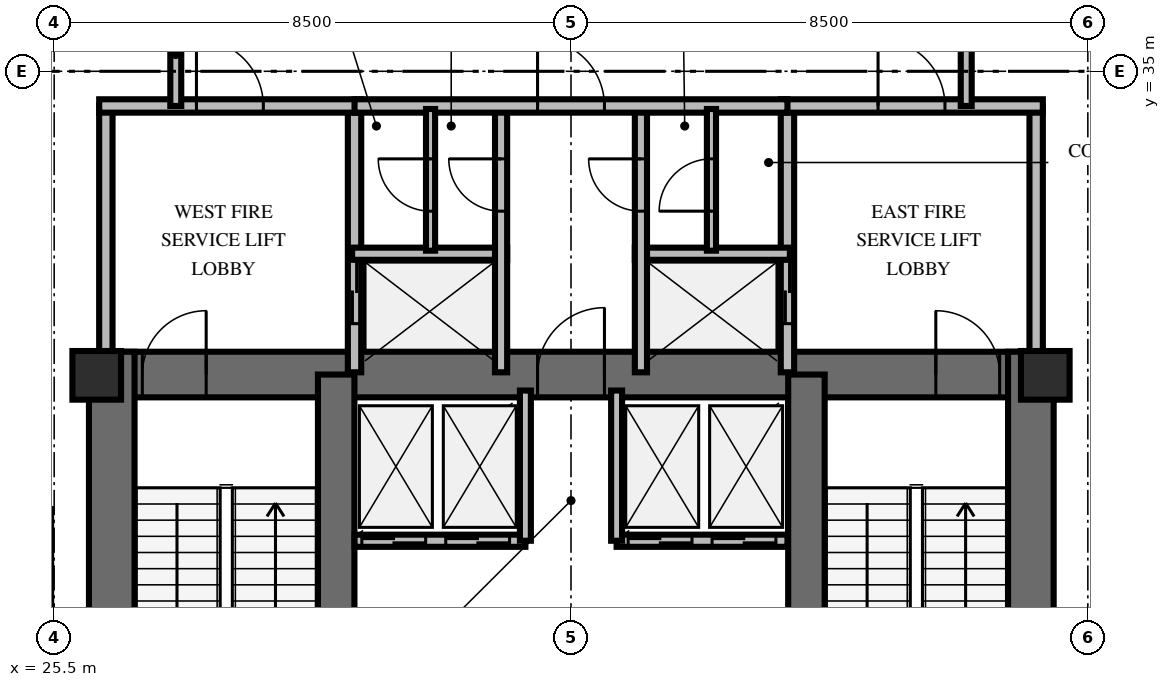
"""IFC4 building model, lengths in metres.
Left out: names, types, materials, properties, quantities, classifications, styles, units other than length and angle.
Written with IfcOpenShell. Run it as: python <this file> out.ifc"""

import sys

from ifc_helpers import new_model, si_unit, direction, frame, frame_2d, origin, origin_2d, place, context, subcontext, project, spatial, rectangle, extrude, element, fill, save


model = new_model("IFC4")
c1 = context("Model", 3, precision=1e-05, world=origin(), true_north=direction((0.0, 1.0)))
c2 = subcontext(c1, "Body", "Model", "MODEL_VIEW")
j1 = project(units=[si_unit("LENGTHUNIT", "METRE"), si_unit("PLANEANGLEUNIT", "RADIAN")], contexts=[c1])
p1 = place(None, origin())
s1 = spatial("IfcSite", under=j1, at=p1, CompositionType="ELEMENT")
p2 = place(p1, origin())
s2 = spatial("IfcBuilding", under=s1, at=p2, CompositionType="ELEMENT")
p3 = place(p2, frame((0.0, 0.0, 153.8)))
s3 = spatial("IfcBuildingStorey", under=s2, at=p3, CompositionType="ELEMENT", Elevation=153.8)
p4 = place(p3, frame((26.072, 30.013, 0.0), z_axis=(0.0, 0.0, 1.0), x_axis=(1.0, 0.0, 0.0)))
e1 = element("IfcWall", 1, at=p4, inside=s3, PredefinedType="SHEAR", context=c2, shape_type="SweptSolid", body=[
    extrude(rectangle(XDim=15.866, YDim=0.75, at=frame_2d((7.933, 0.0))), origin(), (0.0, 0.0, 1.0), 4.0),
])
p5 = place(p4, frame((0.878, 0.0, 0.0)))
e2 = element("IfcOpeningElement", 2, at=p5, cuts=e1, PredefinedType="OPENING", context=c2, shape_type="SweptSolid", body=[
    extrude(rectangle(XDim=1.05, YDim=2.15, at=frame_2d((0.525, 1.075))), frame((0.0, 0.385, 0.0), z_axis=(0.0, -1.0, 0.0), x_axis=(1.0, 0.0, 0.0)), (0.0, 0.0, 1.0), 0.77),
])
p6 = place(p4, frame((13.928, 0.0, 0.0)))
e3 = element("IfcOpeningElement", 3, at=p6, cuts=e1, PredefinedType="OPENING", context=c2, shape_type="SweptSolid", body=[
    extrude(rectangle(XDim=1.05, YDim=2.15, at=frame_2d((0.525, 1.075))), frame((0.0, 0.385, 0.0), z_axis=(0.0, -1.0, 0.0), x_axis=(1.0, 0.0, 0.0)), (0.0, 0.0, 1.0), 0.77),
])
p7 = place(p4, frame((7.378, 0.0, 0.0)))
e4 = element("IfcOpeningElement", 4, at=p7, cuts=e1, PredefinedType="OPENING", context=c2, shape_type="SweptSolid", body=[
    extrude(rectangle(XDim=1.1, YDim=2.15, at=frame_2d((0.55, 1.075))), frame((0.0, 0.385, 0.0), z_axis=(0.0, -1.0, 0.0), x_axis=(1.0, 0.0, 0.0)), (0.0, 0.0, 1.0), 0.77),
])
for number, where, z_axis, x_axis in (
    (5, (26.447, 19.812, 0.0), (0.0, 0.0, 1.0), (0.0, 1.0, 0.0)),
    (6, (41.563, 19.812, 0.0), (0.0, 0.0, 1.0), (0.0, 1.0, 0.0)),
):
    element("IfcWall", number, at=place(p3, frame(where, z_axis=z_axis, x_axis=x_axis)), inside=s3, PredefinedType="SHEAR", context=c2, shape_type="SweptSolid", body=[
        extrude(rectangle(XDim=10.576, YDim=0.75, at=frame_2d((5.288, 0.0))), origin(), (0.0, 0.0, 1.0), 4.0),
    ])
for number, where, z_axis, x_axis in (
    (7, (30.138, 20.187, 0.0), (0.0, 0.0, 1.0), (0.0, 1.0, 0.0)),
    (8, (37.872, 20.187, 0.0), (0.0, 0.0, 1.0), (0.0, 1.0, 0.0)),
):
    element("IfcWall", number, at=place(p3, frame(where, z_axis=z_axis, x_axis=x_axis)), inside=s3, PredefinedType="SHEAR", context=c2, shape_type="SweptSolid", body=[
        extrude(rectangle(XDim=9.826, YDim=0.6, at=frame_2d((4.913, 0.0))), origin(), (0.0, 0.0, 1.0), 4.0),
    ])
for number, where, z_axis, x_axis in (
    (9, (26.2, 30.0, 0.0), (0.0, 0.0, 1.0), (1.0, 0.0, 0.0)),
    (10, (41.8, 30.0, 0.0), (0.0, 0.0, 1.0), (1.0, 0.0, 0.0)),
):
    element("IfcColumn", number, at=place(p3, frame(where, z_axis=z_axis, x_axis=x_axis)), inside=s3, PredefinedType="PILASTER", context=c2, shape_type="SweptSolid", body=[
        extrude(rectangle(XDim=0.8, YDim=0.8, at=origin_2d()), origin(), (0.0, 0.0, 1.0), 4.0),
    ])
p8 = place(p3, frame((26.35, 30.05, 0.0), z_axis=(0.0, 0.0, 1.0), x_axis=(0.0, 1.0, 0.0)))
e11 = element("IfcWall", 11, at=p8, inside=s3, PredefinedType="SOLIDWALL", context=c2, shape_type="SweptSolid", body=[
    extrude(rectangle(XDim=4.38, YDim=0.22, at=frame_2d((2.19, 0.0))), origin(), (0.0, 0.0, 1.0), 2.76),
])
p9 = place(p3, frame((30.44, 30.05, 0.0), z_axis=(0.0, 0.0, 1.0), x_axis=(0.0, 1.0, 0.0)))
e12 = element("IfcWall", 12, at=p9, inside=s3, PredefinedType="SOLIDWALL", context=c2, shape_type="SweptSolid", body=[
    extrude(rectangle(XDim=4.38, YDim=0.22, at=frame_2d((2.19, 0.0))), origin(), (0.0, 0.0, 1.0), 2.76),
])
p10 = place(p9, frame((0.8, 0.0, 0.0)))
e13 = element("IfcOpeningElement", 13, at=p10, cuts=e12, PredefinedType="OPENING", context=c2, shape_type="SweptSolid", body=[
    extrude(rectangle(XDim=1.05, YDim=2.1, at=frame_2d((0.525, 1.05))), frame((0.0, 0.12, 0.0), z_axis=(0.0, -1.0, 0.0), x_axis=(1.0, 0.0, 0.0)), (0.0, 0.0, 1.0), 0.24),
])
p11 = place(p3, frame((26.24, 34.43, 0.0), z_axis=(0.0, 0.0, 1.0), x_axis=(1.0, 0.0, 0.0)))
e14 = element("IfcWall", 14, at=p11, inside=s3, PredefinedType="SOLIDWALL", context=c2, shape_type="SweptSolid", body=[
    extrude(rectangle(XDim=4.31, YDim=0.22, at=frame_2d((2.155, 0.0))), origin(), (0.0, 0.0, 1.0), 2.76),
])
p12 = place(p11, frame((1.6, 0.0, 0.0)))
e15 = element("IfcOpeningElement", 15, at=p12, cuts=e14, PredefinedType="OPENING", context=c2, shape_type="SweptSolid", body=[
    extrude(rectangle(XDim=1.1, YDim=2.15, at=frame_2d((0.55, 1.075))), frame((0.0, 0.12, 0.0), z_axis=(0.0, -1.0, 0.0), x_axis=(1.0, 0.0, 0.0)), (0.0, 0.0, 1.0), 0.24),
])
p13 = place(p3, frame((30.4, 32.0, 0.0), z_axis=(0.0, 0.0, 1.0), x_axis=(1.0, 0.0, 0.0)))
e16 = element("IfcWall", 16, at=p13, inside=s3, PredefinedType="SOLIDWALL", context=c2, shape_type="SweptSolid", body=[
    extrude(rectangle(XDim=2.55, YDim=0.2, at=frame_2d((1.275, 0.0))), origin(), (0.0, 0.0, 1.0), 2.76),
])
p14 = place(p3, frame((32.85, 30.05, 0.0), z_axis=(0.0, 0.0, 1.0), x_axis=(0.0, 1.0, 0.0)))
e17 = element("IfcWall", 17, at=p14, inside=s3, PredefinedType="SOLIDWALL", context=c2, shape_type="SweptSolid", body=[
    extrude(rectangle(XDim=4.38, YDim=0.2, at=frame_2d((2.19, 0.0))), origin(), (0.0, 0.0, 1.0), 2.76),
])
p15 = place(p14, frame((2.65, 0.0, 0.0)))
e18 = element("IfcOpeningElement", 18, at=p15, cuts=e17, PredefinedType="OPENING", context=c2, shape_type="SweptSolid", body=[
    extrude(rectangle(XDim=0.86, YDim=2.05, at=frame_2d((0.43, 1.025))), frame((0.0, 0.11, 0.0), z_axis=(0.0, -1.0, 0.0), x_axis=(1.0, 0.0, 0.0)), (0.0, 0.0, 1.0), 0.22),
])
p16 = place(p3, frame((37.56, 30.05, 0.0), z_axis=(0.0, 0.0, 1.0), x_axis=(0.0, 1.0, 0.0)))
e19 = element("IfcWall", 19, at=p16, inside=s3, PredefinedType="SOLIDWALL", context=c2, shape_type="SweptSolid", body=[
    extrude(rectangle(XDim=4.38, YDim=0.22, at=frame_2d((2.19, 0.0))), origin(), (0.0, 0.0, 1.0), 2.76),
])
p17 = place(p16, frame((0.8, 0.0, 0.0)))
e20 = element("IfcOpeningElement", 20, at=p17, cuts=e19, PredefinedType="OPENING", context=c2, shape_type="SweptSolid", body=[
    extrude(rectangle(XDim=1.05, YDim=2.1, at=frame_2d((0.525, 1.05))), frame((0.0, 0.12, 0.0), z_axis=(0.0, -1.0, 0.0), x_axis=(1.0, 0.0, 0.0)), (0.0, 0.0, 1.0), 0.24),
])
p18 = place(p3, frame((41.65, 30.05, 0.0), z_axis=(0.0, 0.0, 1.0), x_axis=(0.0, 1.0, 0.0)))
e21 = element("IfcWall", 21, at=p18, inside=s3, PredefinedType="SOLIDWALL", context=c2, shape_type="SweptSolid", body=[
    extrude(rectangle(XDim=4.38, YDim=0.22, at=frame_2d((2.19, 0.0))), origin(), (0.0, 0.0, 1.0), 2.76),
])
p19 = place(p3, frame((37.45, 34.43, 0.0), z_axis=(0.0, 0.0, 1.0), x_axis=(1.0, 0.0, 0.0)))
e22 = element("IfcWall", 22, at=p19, inside=s3, PredefinedType="SOLIDWALL", context=c2, shape_type="SweptSolid", body=[
    extrude(rectangle(XDim=4.31, YDim=0.22, at=frame_2d((2.155, 0.0))), origin(), (0.0, 0.0, 1.0), 2.76),
])
p20 = place(p19, frame((1.6, 0.0, 0.0)))
e23 = element("IfcOpeningElement", 23, at=p20, cuts=e22, PredefinedType="OPENING", context=c2, shape_type="SweptSolid", body=[
    extrude(rectangle(XDim=1.1, YDim=2.15, at=frame_2d((0.55, 1.075))), frame((0.0, 0.12, 0.0), z_axis=(0.0, -1.0, 0.0), x_axis=(1.0, 0.0, 0.0)), (0.0, 0.0, 1.0), 0.24),
])
p21 = place(p3, frame((35.05, 32.0, 0.0), z_axis=(0.0, 0.0, 1.0), x_axis=(1.0, 0.0, 0.0)))
e24 = element("IfcWall", 24, at=p21, inside=s3, PredefinedType="SOLIDWALL", context=c2, shape_type="SweptSolid", body=[
    extrude(rectangle(XDim=2.55, YDim=0.2, at=frame_2d((1.275, 0.0))), origin(), (0.0, 0.0, 1.0), 2.76),
])
p22 = place(p3, frame((35.15, 30.05, 0.0), z_axis=(0.0, 0.0, 1.0), x_axis=(0.0, 1.0, 0.0)))
e25 = element("IfcWall", 25, at=p22, inside=s3, PredefinedType="SOLIDWALL", context=c2, shape_type="SweptSolid", body=[
    extrude(rectangle(XDim=4.38, YDim=0.2, at=frame_2d((2.19, 0.0))), origin(), (0.0, 0.0, 1.0), 2.76),
])
p23 = place(p22, frame((2.65, 0.0, 0.0)))
e26 = element("IfcOpeningElement", 26, at=p23, cuts=e25, PredefinedType="OPENING", context=c2, shape_type="SweptSolid", body=[
    extrude(rectangle(XDim=0.86, YDim=2.05, at=frame_2d((0.43, 1.025))), frame((0.0, 0.11, 0.0), z_axis=(0.0, -1.0, 0.0), x_axis=(1.0, 0.0, 0.0)), (0.0, 0.0, 1.0), 0.22),
])
p24 = place(p3, frame((30.44, 34.43, 0.0), z_axis=(0.0, 0.0, 1.0), x_axis=(1.0, 0.0, 0.0)))
e27 = element("IfcWall", 27, at=p24, inside=s3, PredefinedType="SOLIDWALL", context=c2, shape_type="SweptSolid", body=[
    extrude(rectangle(XDim=7.12, YDim=0.22, at=frame_2d((3.56, 0.0))), origin(), (0.0, 0.0, 1.0), 2.76),
])
p25 = place(p24, frame((3.01, 0.0, 0.0)))
e28 = element("IfcOpeningElement", 28, at=p25, cuts=e27, PredefinedType="OPENING", context=c2, shape_type="SweptSolid", body=[
    extrude(rectangle(XDim=1.1, YDim=2.15, at=frame_2d((0.55, 1.075))), frame((0.0, 0.12, 0.0), z_axis=(0.0, -1.0, 0.0), x_axis=(1.0, 0.0, 0.0)), (0.0, 0.0, 1.0), 0.24),
])
p26 = place(p3, frame((31.69, 32.05, 0.0), z_axis=(0.0, 0.0, 1.0), x_axis=(0.0, 1.0, 0.0)))
e29 = element("IfcWall", 29, at=p26, inside=s3, PredefinedType="PARTITIONING", context=c2, shape_type="SweptSolid", body=[
    extrude(rectangle(XDim=2.33, YDim=0.15, at=frame_2d((1.165, 0.0))), origin(), (0.0, 0.0, 1.0), 2.76),
])
p27 = place(p26, frame((0.65, 0.0, 0.0)))
e30 = element("IfcOpeningElement", 30, at=p27, cuts=e29, PredefinedType="OPENING", context=c2, shape_type="SweptSolid", body=[
    extrude(rectangle(XDim=0.86, YDim=2.05, at=frame_2d((0.43, 1.025))), frame((0.0, 0.085, 0.0), z_axis=(0.0, -1.0, 0.0), x_axis=(1.0, 0.0, 0.0)), (0.0, 0.0, 1.0), 0.17),
])
p28 = place(p3, frame((36.31, 32.05, 0.0), z_axis=(0.0, 0.0, 1.0), x_axis=(0.0, 1.0, 0.0)))
e31 = element("IfcWall", 31, at=p28, inside=s3, PredefinedType="PARTITIONING", context=c2, shape_type="SweptSolid", body=[
    extrude(rectangle(XDim=2.33, YDim=0.15, at=frame_2d((1.165, 0.0))), origin(), (0.0, 0.0, 1.0), 2.76),
])
p29 = place(p28, frame((0.65, 0.0, 0.0)))
e32 = element("IfcOpeningElement", 32, at=p29, cuts=e31, PredefinedType="OPENING", context=c2, shape_type="SweptSolid", body=[
    extrude(rectangle(XDim=0.86, YDim=2.05, at=frame_2d((0.43, 1.025))), frame((0.0, 0.085, 0.0), z_axis=(0.0, -1.0, 0.0), x_axis=(1.0, 0.0, 0.0)), (0.0, 0.0, 1.0), 0.17),
])
p30 = place(p3, frame((30.44, 27.28, 0.0), z_axis=(0.0, 0.0, 1.0), x_axis=(1.0, 0.0, 0.0)))
e33 = element("IfcWall", 33, at=p30, inside=s3, PredefinedType="SOLIDWALL", context=c2, shape_type="SweptSolid", body=[
    extrude(rectangle(XDim=2.81, YDim=0.2, at=frame_2d((1.405, 0.0))), origin(), (0.0, 0.0, 1.0), 2.76),
])
p31 = place(p30, frame((0.12, 0.0, 0.0)))
e34 = element("IfcOpeningElement", 34, at=p31, cuts=e33, PredefinedType="OPENING", context=c2, shape_type="SweptSolid", body=[
    extrude(rectangle(XDim=1.05, YDim=2.1, at=frame_2d((0.525, 1.05))), frame((0.0, 0.11, 0.0), z_axis=(0.0, -1.0, 0.0), x_axis=(1.0, 0.0, 0.0)), (0.0, 0.0, 1.0), 0.22),
])
p32 = place(p30, frame((1.5, 0.0, 0.0)))
e35 = element("IfcOpeningElement", 35, at=p32, cuts=e33, PredefinedType="OPENING", context=c2, shape_type="SweptSolid", body=[
    extrude(rectangle(XDim=1.05, YDim=2.1, at=frame_2d((0.525, 1.05))), frame((0.0, 0.11, 0.0), z_axis=(0.0, -1.0, 0.0), x_axis=(1.0, 0.0, 0.0)), (0.0, 0.0, 1.0), 0.22),
])
p33 = place(p3, frame((33.25, 27.28, 0.0), z_axis=(0.0, 0.0, 1.0), x_axis=(0.0, 1.0, 0.0)))
e36 = element("IfcWall", 36, at=p33, inside=s3, PredefinedType="SOLIDWALL", context=c2, shape_type="SweptSolid", body=[
    extrude(rectangle(XDim=2.47, YDim=0.18, at=frame_2d((1.235, 0.0))), origin(), (0.0, 0.0, 1.0), 2.76),
])
p34 = place(p3, frame((34.75, 27.28, 0.0), z_axis=(0.0, 0.0, 1.0), x_axis=(1.0, 0.0, 0.0)))
e37 = element("IfcWall", 37, at=p34, inside=s3, PredefinedType="SOLIDWALL", context=c2, shape_type="SweptSolid", body=[
    extrude(rectangle(XDim=2.81, YDim=0.2, at=frame_2d((1.405, 0.0))), origin(), (0.0, 0.0, 1.0), 2.76),
])
p35 = place(p34, frame((0.19, 0.0, 0.0)))
e38 = element("IfcOpeningElement", 38, at=p35, cuts=e37, PredefinedType="OPENING", context=c2, shape_type="SweptSolid", body=[
    extrude(rectangle(XDim=1.05, YDim=2.1, at=frame_2d((0.525, 1.05))), frame((0.0, 0.11, 0.0), z_axis=(0.0, -1.0, 0.0), x_axis=(1.0, 0.0, 0.0)), (0.0, 0.0, 1.0), 0.22),
])
p36 = place(p34, frame((1.57, 0.0, 0.0)))
e39 = element("IfcOpeningElement", 39, at=p36, cuts=e37, PredefinedType="OPENING", context=c2, shape_type="SweptSolid", body=[
    extrude(rectangle(XDim=1.05, YDim=2.1, at=frame_2d((0.525, 1.05))), frame((0.0, 0.11, 0.0), z_axis=(0.0, -1.0, 0.0), x_axis=(1.0, 0.0, 0.0)), (0.0, 0.0, 1.0), 0.22),
])
p37 = place(p3, frame((34.75, 27.28, 0.0), z_axis=(0.0, 0.0, 1.0), x_axis=(0.0, 1.0, 0.0)))
e40 = element("IfcWall", 40, at=p37, inside=s3, PredefinedType="SOLIDWALL", context=c2, shape_type="SweptSolid", body=[
    extrude(rectangle(XDim=2.47, YDim=0.18, at=frame_2d((1.235, 0.0))), origin(), (0.0, 0.0, 1.0), 2.76),
])
for number, where, z_axis, x_axis in (
    (41, (27.5, 34.43, 0.0), (0.0, 0.0, 1.0), (0.0, 1.0, 0.0)),
    (42, (40.5, 36.123, 0.0), (0.0, 0.0, 1.0), (0.0, -1.0, 0.0)),
):
    element("IfcWall", number, at=place(p3, frame(where, z_axis=z_axis, x_axis=x_axis)), inside=s3, PredefinedType="PARTITIONING", context=c2, shape_type="SweptSolid", body=[
        extrude(rectangle(XDim=1.693, YDim=0.18, at=frame_2d((0.846, 0.0))), origin(), (0.0, 0.0, 1.0), 2.76),
    ])
p38 = place(p5, origin())
e43 = element("IfcDoor", 43, at=p38, inside=s3, OperationType="SINGLE_SWING_RIGHT", PredefinedType="DOOR", context=c2, shape_type="SweptSolid", body=[
    extrude(rectangle(XDim=1.05, YDim=2.15, at=frame_2d((0.525, 1.075))), frame((0.0, 0.025, 0.0), z_axis=(0.0, -1.0, 0.0), x_axis=(1.0, 0.0, 0.0)), (0.0, 0.0, 1.0), 0.05),
])
fill(e2, e43)
p39 = place(p6, origin())
e44 = element("IfcDoor", 44, at=p39, inside=s3, OperationType="SINGLE_SWING_LEFT", PredefinedType="DOOR", context=c2, shape_type="SweptSolid", body=[
    extrude(rectangle(XDim=1.05, YDim=2.15, at=frame_2d((0.525, 1.075))), frame((0.0, 0.025, 0.0), z_axis=(0.0, -1.0, 0.0), x_axis=(1.0, 0.0, 0.0)), (0.0, 0.0, 1.0), 0.05),
])
fill(e3, e44)
p40 = place(p7, origin())
e45 = element("IfcDoor", 45, at=p40, inside=s3, OperationType="SINGLE_SWING_RIGHT", PredefinedType="DOOR", context=c2, shape_type="SweptSolid", body=[
    extrude(rectangle(XDim=1.1, YDim=2.15, at=frame_2d((0.55, 1.075))), frame((0.0, 0.025, 0.0), z_axis=(0.0, -1.0, 0.0), x_axis=(1.0, 0.0, 0.0)), (0.0, 0.0, 1.0), 0.05),
])
fill(e4, e45)
p41 = place(p12, origin())
e46 = element("IfcDoor", 46, at=p41, inside=s3, OperationType="SINGLE_SWING_LEFT", PredefinedType="DOOR", context=c2, shape_type="SweptSolid", body=[
    extrude(rectangle(XDim=1.1, YDim=2.15, at=frame_2d((0.55, 1.075))), frame((0.0, 0.025, 0.0), z_axis=(0.0, -1.0, 0.0), x_axis=(1.0, 0.0, 0.0)), (0.0, 0.0, 1.0), 0.05),
])
fill(e15, e46)
p42 = place(p10, origin())
e47 = element("IfcDoor", 47, at=p42, inside=s3, OperationType="DOUBLE_DOOR_SLIDING", PredefinedType="USERDEFINED", context=c2, shape_type="SweptSolid", body=[
    extrude(rectangle(XDim=1.05, YDim=2.1, at=frame_2d((0.525, 1.05))), frame((0.0, 0.025, 0.0), z_axis=(0.0, -1.0, 0.0), x_axis=(1.0, 0.0, 0.0)), (0.0, 0.0, 1.0), 0.05),
])
fill(e13, e47)
p43 = place(p15, origin())
e48 = element("IfcDoor", 48, at=p43, inside=s3, OperationType="SINGLE_SWING_RIGHT", PredefinedType="TRAPDOOR", context=c2, shape_type="SweptSolid", body=[
    extrude(rectangle(XDim=0.86, YDim=2.05, at=frame_2d((0.43, 1.025))), frame((0.0, 0.025, 0.0), z_axis=(0.0, -1.0, 0.0), x_axis=(1.0, 0.0, 0.0)), (0.0, 0.0, 1.0), 0.05),
])
fill(e18, e48)
p44 = place(p20, origin())
e49 = element("IfcDoor", 49, at=p44, inside=s3, OperationType="SINGLE_SWING_LEFT", PredefinedType="DOOR", context=c2, shape_type="SweptSolid", body=[
    extrude(rectangle(XDim=1.1, YDim=2.15, at=frame_2d((0.55, 1.075))), frame((0.0, 0.025, 0.0), z_axis=(0.0, -1.0, 0.0), x_axis=(1.0, 0.0, 0.0)), (0.0, 0.0, 1.0), 0.05),
])
fill(e23, e49)
p45 = place(p17, origin())
e50 = element("IfcDoor", 50, at=p45, inside=s3, OperationType="DOUBLE_DOOR_SLIDING", PredefinedType="USERDEFINED", context=c2, shape_type="SweptSolid", body=[
    extrude(rectangle(XDim=1.05, YDim=2.1, at=frame_2d((0.525, 1.05))), frame((0.0, 0.025, 0.0), z_axis=(0.0, -1.0, 0.0), x_axis=(1.0, 0.0, 0.0)), (0.0, 0.0, 1.0), 0.05),
])
fill(e20, e50)
p46 = place(p23, origin())
e51 = element("IfcDoor", 51, at=p46, inside=s3, OperationType="SINGLE_SWING_RIGHT", PredefinedType="TRAPDOOR", context=c2, shape_type="SweptSolid", body=[
    extrude(rectangle(XDim=0.86, YDim=2.05, at=frame_2d((0.43, 1.025))), frame((0.0, 0.025, 0.0), z_axis=(0.0, -1.0, 0.0), x_axis=(1.0, 0.0, 0.0)), (0.0, 0.0, 1.0), 0.05),
])
fill(e26, e51)
p47 = place(p25, origin())
e52 = element("IfcDoor", 52, at=p47, inside=s3, OperationType="SINGLE_SWING_LEFT", PredefinedType="DOOR", context=c2, shape_type="SweptSolid", body=[
    extrude(rectangle(XDim=1.1, YDim=2.15, at=frame_2d((0.55, 1.075))), frame((0.0, 0.025, 0.0), z_axis=(0.0, -1.0, 0.0), x_axis=(1.0, 0.0, 0.0)), (0.0, 0.0, 1.0), 0.05),
])
fill(e28, e52)
p48 = place(p27, origin())
e53 = element("IfcDoor", 53, at=p48, inside=s3, OperationType="SINGLE_SWING_RIGHT", PredefinedType="TRAPDOOR", context=c2, shape_type="SweptSolid", body=[
    extrude(rectangle(XDim=0.86, YDim=2.05, at=frame_2d((0.43, 1.025))), frame((0.0, 0.025, 0.0), z_axis=(0.0, -1.0, 0.0), x_axis=(1.0, 0.0, 0.0)), (0.0, 0.0, 1.0), 0.05),
])
fill(e30, e53)
p49 = place(p29, origin())
e54 = element("IfcDoor", 54, at=p49, inside=s3, OperationType="SINGLE_SWING_LEFT", PredefinedType="TRAPDOOR", context=c2, shape_type="SweptSolid", body=[
    extrude(rectangle(XDim=0.86, YDim=2.05, at=frame_2d((0.43, 1.025))), frame((0.0, 0.025, 0.0), z_axis=(0.0, -1.0, 0.0), x_axis=(1.0, 0.0, 0.0)), (0.0, 0.0, 1.0), 0.05),
])
fill(e32, e54)
p50 = place(p31, origin())
e55 = element("IfcDoor", 55, at=p50, inside=s3, OperationType="DOUBLE_DOOR_SLIDING", PredefinedType="USERDEFINED", context=c2, shape_type="SweptSolid", body=[
    extrude(rectangle(XDim=1.05, YDim=2.1, at=frame_2d((0.525, 1.05))), frame((0.0, 0.025, 0.0), z_axis=(0.0, -1.0, 0.0), x_axis=(1.0, 0.0, 0.0)), (0.0, 0.0, 1.0), 0.05),
])
fill(e34, e55)
p51 = place(p32, origin())
e56 = element("IfcDoor", 56, at=p51, inside=s3, OperationType="DOUBLE_DOOR_SLIDING", PredefinedType="USERDEFINED", context=c2, shape_type="SweptSolid", body=[
    extrude(rectangle(XDim=1.05, YDim=2.1, at=frame_2d((0.525, 1.05))), frame((0.0, 0.025, 0.0), z_axis=(0.0, -1.0, 0.0), x_axis=(1.0, 0.0, 0.0)), (0.0, 0.0, 1.0), 0.05),
])
fill(e35, e56)
p52 = place(p35, origin())
e57 = element("IfcDoor", 57, at=p52, inside=s3, OperationType="DOUBLE_DOOR_SLIDING", PredefinedType="USERDEFINED", context=c2, shape_type="SweptSolid", body=[
    extrude(rectangle(XDim=1.05, YDim=2.1, at=frame_2d((0.525, 1.05))), frame((0.0, 0.025, 0.0), z_axis=(0.0, -1.0, 0.0), x_axis=(1.0, 0.0, 0.0)), (0.0, 0.0, 1.0), 0.05),
])
fill(e38, e57)
p53 = place(p36, origin())
e58 = element("IfcDoor", 58, at=p53, inside=s3, OperationType="DOUBLE_DOOR_SLIDING", PredefinedType="USERDEFINED", context=c2, shape_type="SweptSolid", body=[
    extrude(rectangle(XDim=1.05, YDim=2.1, at=frame_2d((0.525, 1.05))), frame((0.0, 0.025, 0.0), z_axis=(0.0, -1.0, 0.0), x_axis=(1.0, 0.0, 0.0)), (0.0, 0.0, 1.0), 0.05),
])
fill(e39, e58)
save(model, sys.argv[1])
